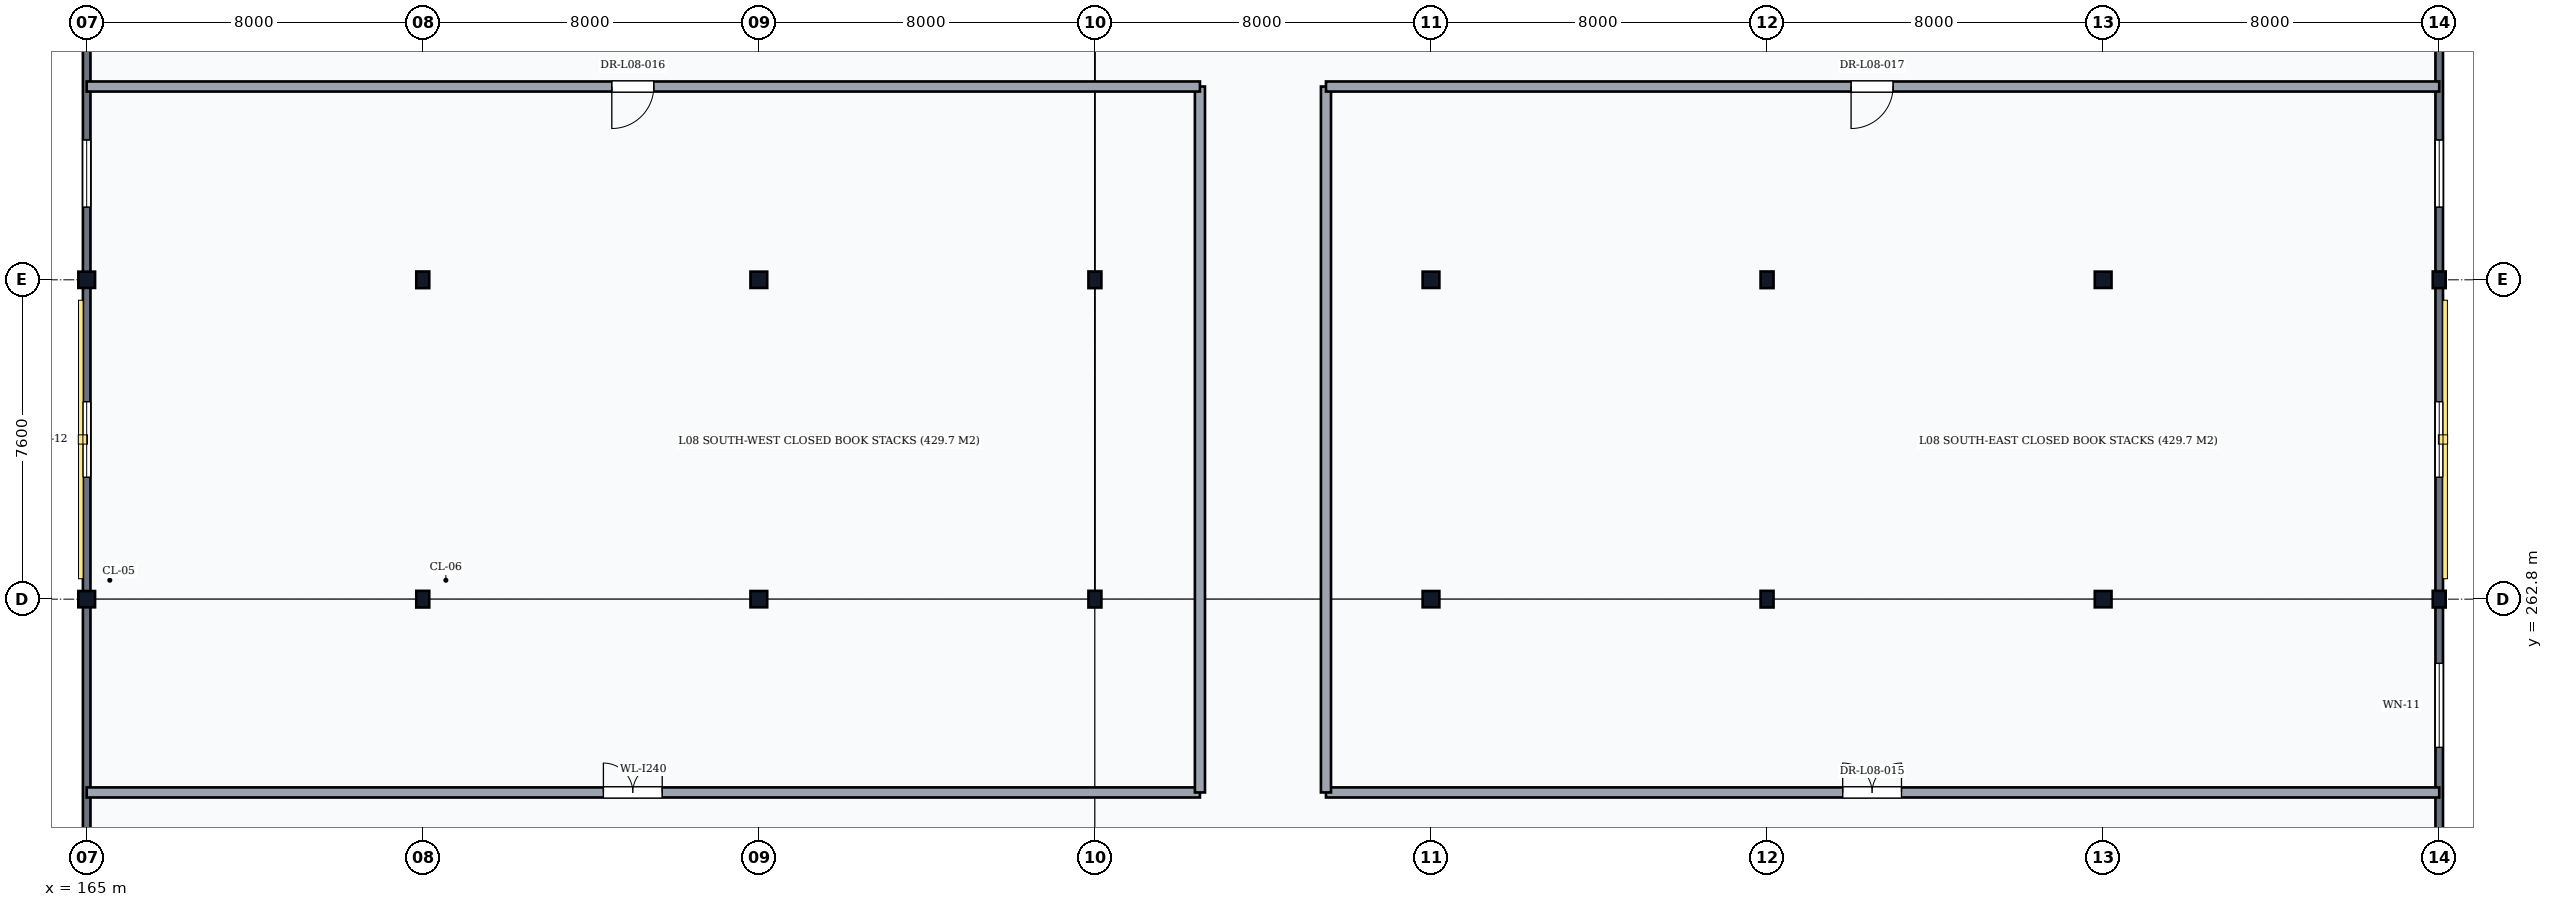
"""IFC4 building model, lengths in metres.
Left out: names, types, materials, properties, quantities, classifications, styles, units other than length and angle.
Written with IfcOpenShell. Run it as: python <this file> out.ifc"""

import sys

from ifc_helpers import new_model, si_unit, direction, frame, frame_2d, origin, origin_2d, place, context, subcontext, project, spatial, rectangle, i_section, extrude, element, fill, save


model = new_model("IFC4")
c1 = context("Model", 3, precision=1e-05, world=origin(), true_north=direction((0.0, 1.0)))
c2 = subcontext(c1, "Body", "Model", "MODEL_VIEW")
j1 = project(units=[si_unit("LENGTHUNIT", "METRE"), si_unit("PLANEANGLEUNIT", "RADIAN")], contexts=[c1])
p1 = place(None, origin())
s1 = spatial("IfcSite", under=j1, at=p1, CompositionType="ELEMENT")
p2 = place(p1, origin())
s2 = spatial("IfcBuilding", under=s1, at=p2, CompositionType="ELEMENT")
p3 = place(p2, frame((0.0, 0.0, 32.1)))
s3 = spatial("IfcBuildingStorey", under=s2, at=p3, CompositionType="ELEMENT", Elevation=32.1)
for number, where, z_axis, x_axis in (
    (1, (165.0, 262.8, 0.0), (0.0, 0.0, 1.0), (1.0, 0.0, 0.0)),
    (2, (165.0, 270.4, 0.0), (0.0, 0.0, 1.0), (1.0, 0.0, 0.0)),
):
    element("IfcColumn", number, at=place(p3, frame(where, z_axis=z_axis, x_axis=x_axis)), inside=s3, PredefinedType="COLUMN", context=c2, shape_type="SweptSolid", body=[
        extrude(i_section(OverallWidth=0.398, OverallDepth=0.387, WebThickness=0.021, FlangeThickness=0.033, FilletRadius=0.015, at=origin_2d()), origin(), (0.0, 0.0, 1.0), 3.9),
    ])
for number, where, z_axis, x_axis in (
    (3, (173.0, 262.8, 0.0), (0.0, 0.0, 1.0), (1.0, 0.0, 0.0)),
    (4, (173.0, 270.4, 0.0), (0.0, 0.0, 1.0), (1.0, 0.0, 0.0)),
):
    element("IfcColumn", number, at=place(p3, frame(where, z_axis=z_axis, x_axis=x_axis)), inside=s3, PredefinedType="COLUMN", context=c2, shape_type="SweptSolid", body=[
        extrude(i_section(OverallWidth=0.308, OverallDepth=0.395, WebThickness=0.021, FlangeThickness=0.04, FilletRadius=0.027, at=origin_2d()), origin(), (0.0, 0.0, 1.0), 3.9),
    ])
for number, where, z_axis, x_axis in (
    (5, (181.0, 262.8, 0.0), (0.0, 0.0, 1.0), (1.0, 0.0, 0.0)),
    (6, (181.0, 270.4, 0.0), (0.0, 0.0, 1.0), (1.0, 0.0, 0.0)),
):
    element("IfcColumn", number, at=place(p3, frame(where, z_axis=z_axis, x_axis=x_axis)), inside=s3, PredefinedType="COLUMN", context=c2, shape_type="SweptSolid", body=[
        extrude(i_section(OverallWidth=0.398, OverallDepth=0.387, WebThickness=0.021, FlangeThickness=0.033, FilletRadius=0.015, at=origin_2d()), origin(), (0.0, 0.0, 1.0), 3.9),
    ])
for number, where, z_axis, x_axis in (
    (7, (189.0, 262.8, 0.0), (0.0, 0.0, 1.0), (1.0, 0.0, 0.0)),
    (8, (189.0, 270.4, 0.0), (0.0, 0.0, 1.0), (1.0, 0.0, 0.0)),
):
    element("IfcColumn", number, at=place(p3, frame(where, z_axis=z_axis, x_axis=x_axis)), inside=s3, PredefinedType="COLUMN", context=c2, shape_type="SweptSolid", body=[
        extrude(i_section(OverallWidth=0.308, OverallDepth=0.395, WebThickness=0.021, FlangeThickness=0.04, FilletRadius=0.027, at=origin_2d()), origin(), (0.0, 0.0, 1.0), 3.9),
    ])
for number, where, z_axis, x_axis in (
    (9, (197.0, 262.8, 0.0), (0.0, 0.0, 1.0), (1.0, 0.0, 0.0)),
    (10, (197.0, 270.4, 0.0), (0.0, 0.0, 1.0), (1.0, 0.0, 0.0)),
):
    element("IfcColumn", number, at=place(p3, frame(where, z_axis=z_axis, x_axis=x_axis)), inside=s3, PredefinedType="COLUMN", context=c2, shape_type="SweptSolid", body=[
        extrude(i_section(OverallWidth=0.398, OverallDepth=0.387, WebThickness=0.021, FlangeThickness=0.033, FilletRadius=0.015, at=origin_2d()), origin(), (0.0, 0.0, 1.0), 3.9),
    ])
for number, where, z_axis, x_axis in (
    (11, (205.0, 262.8, 0.0), (0.0, 0.0, 1.0), (1.0, 0.0, 0.0)),
    (12, (205.0, 270.4, 0.0), (0.0, 0.0, 1.0), (1.0, 0.0, 0.0)),
):
    element("IfcColumn", number, at=place(p3, frame(where, z_axis=z_axis, x_axis=x_axis)), inside=s3, PredefinedType="COLUMN", context=c2, shape_type="SweptSolid", body=[
        extrude(i_section(OverallWidth=0.308, OverallDepth=0.395, WebThickness=0.021, FlangeThickness=0.04, FilletRadius=0.027, at=origin_2d()), origin(), (0.0, 0.0, 1.0), 3.9),
    ])
for number, where, z_axis, x_axis in (
    (13, (213.0, 262.8, 0.0), (0.0, 0.0, 1.0), (1.0, 0.0, 0.0)),
    (14, (213.0, 270.4, 0.0), (0.0, 0.0, 1.0), (1.0, 0.0, 0.0)),
):
    element("IfcColumn", number, at=place(p3, frame(where, z_axis=z_axis, x_axis=x_axis)), inside=s3, PredefinedType="COLUMN", context=c2, shape_type="SweptSolid", body=[
        extrude(i_section(OverallWidth=0.398, OverallDepth=0.387, WebThickness=0.021, FlangeThickness=0.033, FilletRadius=0.015, at=origin_2d()), origin(), (0.0, 0.0, 1.0), 3.9),
    ])
for number, where, z_axis, x_axis in (
    (15, (221.0, 262.8, 0.0), (0.0, 0.0, 1.0), (1.0, 0.0, 0.0)),
    (16, (221.0, 270.4, 0.0), (0.0, 0.0, 1.0), (1.0, 0.0, 0.0)),
):
    element("IfcColumn", number, at=place(p3, frame(where, z_axis=z_axis, x_axis=x_axis)), inside=s3, PredefinedType="COLUMN", context=c2, shape_type="SweptSolid", body=[
        extrude(i_section(OverallWidth=0.308, OverallDepth=0.395, WebThickness=0.021, FlangeThickness=0.04, FilletRadius=0.027, at=origin_2d()), origin(), (0.0, 0.0, 1.0), 3.9),
    ])
p4 = place(p3, frame((165.0, 255.206, 0.0), z_axis=(0.0, 0.0, 1.0), x_axis=(0.0, 1.0, 0.0)))
e17 = element("IfcWall", 17, at=p4, inside=s3, PredefinedType="SOLIDWALL", context=c2, shape_type="SweptSolid", body=[
    extrude(rectangle(XDim=7.588, YDim=0.18, at=frame_2d((3.794, 0.0))), origin(), (0.0, 0.0, 1.0), 3.408),
])
p5 = place(p3, frame((165.0, 262.806, 0.0), z_axis=(0.0, 0.0, 1.0), x_axis=(0.0, 1.0, 0.0)))
e18 = element("IfcWall", 18, at=p5, inside=s3, PredefinedType="SOLIDWALL", context=c2, shape_type="SweptSolid", body=[
    extrude(rectangle(XDim=7.588, YDim=0.18, at=frame_2d((3.794, 0.0))), origin(), (0.0, 0.0, 1.0), 3.408),
])
p6 = place(p5, frame((2.894, 0.0, 0.95)))
e19 = element("IfcOpeningElement", 19, at=p6, cuts=e18, PredefinedType="OPENING", context=c2, shape_type="SweptSolid", body=[
    extrude(rectangle(XDim=1.8, YDim=2.0, at=frame_2d((0.9, 1.0))), frame((0.0, 0.105, 0.0), z_axis=(0.0, -1.0, 0.0), x_axis=(1.0, 0.0, 0.0)), (0.0, 0.0, 1.0), 0.21),
])
p7 = place(p3, frame((165.0, 270.406, 0.0), z_axis=(0.0, 0.0, 1.0), x_axis=(0.0, 1.0, 0.0)))
e20 = element("IfcWall", 20, at=p7, inside=s3, PredefinedType="SOLIDWALL", context=c2, shape_type="SweptSolid", body=[
    extrude(rectangle(XDim=7.588, YDim=0.18, at=frame_2d((3.794, 0.0))), origin(), (0.0, 0.0, 1.0), 3.408),
])
p8 = place(p7, frame((1.722, 0.0, 0.95)))
e21 = element("IfcOpeningElement", 21, at=p8, cuts=e20, PredefinedType="OPENING", context=c2, shape_type="SweptSolid", body=[
    extrude(rectangle(XDim=1.6, YDim=2.0, at=frame_2d((0.8, 1.0))), frame((0.0, 0.105, 0.0), z_axis=(0.0, -1.0, 0.0), x_axis=(1.0, 0.0, 0.0)), (0.0, 0.0, 1.0), 0.21),
])
p9 = place(p3, frame((221.0, 255.206, 0.0), z_axis=(0.0, 0.0, 1.0), x_axis=(0.0, 1.0, 0.0)))
e22 = element("IfcWall", 22, at=p9, inside=s3, PredefinedType="SOLIDWALL", context=c2, shape_type="SweptSolid", body=[
    extrude(rectangle(XDim=7.588, YDim=0.18, at=frame_2d((3.794, 0.0))), origin(), (0.0, 0.0, 1.0), 3.408),
])
p10 = place(p9, frame((4.066, 0.0, 0.95)))
e23 = element("IfcOpeningElement", 23, at=p10, cuts=e22, PredefinedType="OPENING", context=c2, shape_type="SweptSolid", body=[
    extrude(rectangle(XDim=2.0, YDim=2.1, at=frame_2d((1.0, 1.05))), frame((0.0, 0.105, 0.0), z_axis=(0.0, -1.0, 0.0), x_axis=(1.0, 0.0, 0.0)), (0.0, 0.0, 1.0), 0.21),
])
p11 = place(p3, frame((221.0, 262.806, 0.0), z_axis=(0.0, 0.0, 1.0), x_axis=(0.0, 1.0, 0.0)))
e24 = element("IfcWall", 24, at=p11, inside=s3, PredefinedType="SOLIDWALL", context=c2, shape_type="SweptSolid", body=[
    extrude(rectangle(XDim=7.588, YDim=0.18, at=frame_2d((3.794, 0.0))), origin(), (0.0, 0.0, 1.0), 3.408),
])
p12 = place(p11, frame((2.894, 0.0, 0.95)))
e25 = element("IfcOpeningElement", 25, at=p12, cuts=e24, PredefinedType="OPENING", context=c2, shape_type="SweptSolid", body=[
    extrude(rectangle(XDim=1.8, YDim=2.0, at=frame_2d((0.9, 1.0))), frame((0.0, 0.105, 0.0), z_axis=(0.0, -1.0, 0.0), x_axis=(1.0, 0.0, 0.0)), (0.0, 0.0, 1.0), 0.21),
])
p13 = place(p3, frame((221.0, 270.406, 0.0), z_axis=(0.0, 0.0, 1.0), x_axis=(0.0, 1.0, 0.0)))
e26 = element("IfcWall", 26, at=p13, inside=s3, PredefinedType="SOLIDWALL", context=c2, shape_type="SweptSolid", body=[
    extrude(rectangle(XDim=7.588, YDim=0.18, at=frame_2d((3.794, 0.0))), origin(), (0.0, 0.0, 1.0), 3.408),
])
p14 = place(p13, frame((1.722, 0.0, 0.95)))
e27 = element("IfcOpeningElement", 27, at=p14, cuts=e26, PredefinedType="OPENING", context=c2, shape_type="SweptSolid", body=[
    extrude(rectangle(XDim=1.6, YDim=2.0, at=frame_2d((0.8, 1.0))), frame((0.0, 0.105, 0.0), z_axis=(0.0, -1.0, 0.0), x_axis=(1.0, 0.0, 0.0)), (0.0, 0.0, 1.0), 0.21),
])
p15 = place(p3, frame((165.0, 258.2, 0.0), z_axis=(0.0, 0.0, 1.0), x_axis=(1.0, 0.0, 0.0)))
e28 = element("IfcWall", 28, at=p15, inside=s3, PredefinedType="PARTITIONING", context=c2, shape_type="SweptSolid", body=[
    extrude(rectangle(XDim=26.5, YDim=0.24, at=frame_2d((13.25, 0.0))), origin(), (0.0, 0.0, 1.0), 3.68),
])
p16 = place(p15, frame((12.3, 0.0, 0.0)))
e29 = element("IfcOpeningElement", 29, at=p16, cuts=e28, PredefinedType="OPENING", context=c2, shape_type="SweptSolid", body=[
    extrude(rectangle(XDim=1.4, YDim=2.1, at=frame_2d((0.7, 1.05))), frame((0.0, 0.135, 0.0), z_axis=(0.0, -1.0, 0.0), x_axis=(1.0, 0.0, 0.0)), (0.0, 0.0, 1.0), 0.27),
])
p17 = place(p3, frame((194.5, 258.2, 0.0), z_axis=(0.0, 0.0, 1.0), x_axis=(1.0, 0.0, 0.0)))
e30 = element("IfcWall", 30, at=p17, inside=s3, PredefinedType="PARTITIONING", context=c2, shape_type="SweptSolid", body=[
    extrude(rectangle(XDim=26.5, YDim=0.24, at=frame_2d((13.25, 0.0))), origin(), (0.0, 0.0, 1.0), 3.68),
])
p18 = place(p17, frame((12.3, 0.0, 0.0)))
e31 = element("IfcOpeningElement", 31, at=p18, cuts=e30, PredefinedType="OPENING", context=c2, shape_type="SweptSolid", body=[
    extrude(rectangle(XDim=1.4, YDim=2.1, at=frame_2d((0.7, 1.05))), frame((0.0, 0.135, 0.0), z_axis=(0.0, -1.0, 0.0), x_axis=(1.0, 0.0, 0.0)), (0.0, 0.0, 1.0), 0.27),
])
for number, where, z_axis, x_axis in (
    (32, (191.5, 258.2, 0.0), (0.0, 0.0, 1.0), (0.0, 1.0, 0.0)),
    (33, (194.5, 258.2, 0.0), (0.0, 0.0, 1.0), (0.0, 1.0, 0.0)),
):
    element("IfcWall", number, at=place(p3, frame(where, z_axis=z_axis, x_axis=x_axis)), inside=s3, PredefinedType="PARTITIONING", context=c2, shape_type="SweptSolid", body=[
        extrude(rectangle(XDim=16.8, YDim=0.24, at=frame_2d((8.4, 0.0))), origin(), (0.0, 0.0, 1.0), 3.68),
    ])
p19 = place(p3, frame((165.0, 275.0, 0.0), z_axis=(0.0, 0.0, 1.0), x_axis=(1.0, 0.0, 0.0)))
e34 = element("IfcWall", 34, at=p19, inside=s3, PredefinedType="PARTITIONING", context=c2, shape_type="SweptSolid", body=[
    extrude(rectangle(XDim=26.5, YDim=0.24, at=frame_2d((13.25, 0.0))), origin(), (0.0, 0.0, 1.0), 3.68),
])
p20 = place(p19, frame((12.5, 0.0, 0.0)))
e35 = element("IfcOpeningElement", 35, at=p20, cuts=e34, PredefinedType="OPENING", context=c2, shape_type="SweptSolid", body=[
    extrude(rectangle(XDim=1.0, YDim=2.1, at=frame_2d((0.5, 1.05))), frame((0.0, 0.135, 0.0), z_axis=(0.0, -1.0, 0.0), x_axis=(1.0, 0.0, 0.0)), (0.0, 0.0, 1.0), 0.27),
])
p21 = place(p3, frame((194.5, 275.0, 0.0), z_axis=(0.0, 0.0, 1.0), x_axis=(1.0, 0.0, 0.0)))
e36 = element("IfcWall", 36, at=p21, inside=s3, PredefinedType="PARTITIONING", context=c2, shape_type="SweptSolid", body=[
    extrude(rectangle(XDim=26.5, YDim=0.24, at=frame_2d((13.25, 0.0))), origin(), (0.0, 0.0, 1.0), 3.68),
])
p22 = place(p21, frame((12.5, 0.0, 0.0)))
e37 = element("IfcOpeningElement", 37, at=p22, cuts=e36, PredefinedType="OPENING", context=c2, shape_type="SweptSolid", body=[
    extrude(rectangle(XDim=1.0, YDim=2.1, at=frame_2d((0.5, 1.05))), frame((0.0, 0.135, 0.0), z_axis=(0.0, -1.0, 0.0), x_axis=(1.0, 0.0, 0.0)), (0.0, 0.0, 1.0), 0.27),
])
p23 = place(p6, origin())
e38 = element("IfcWindow", 38, at=p23, inside=s3, PartitioningType="DOUBLE_PANEL_VERTICAL", PredefinedType="WINDOW", context=c2, shape_type="SweptSolid", body=[
    extrude(rectangle(XDim=1.8, YDim=2.0, at=frame_2d((0.9, 1.0))), frame((0.0, 0.03, 0.0), z_axis=(0.0, -1.0, 0.0), x_axis=(1.0, 0.0, 0.0)), (0.0, 0.0, 1.0), 0.06),
])
fill(e19, e38)
p24 = place(p8, origin())
e39 = element("IfcWindow", 39, at=p24, inside=s3, PartitioningType="SINGLE_PANEL", PredefinedType="WINDOW", context=c2, shape_type="SweptSolid", body=[
    extrude(rectangle(XDim=1.6, YDim=2.0, at=frame_2d((0.8, 1.0))), frame((0.0, 0.03, 0.0), z_axis=(0.0, -1.0, 0.0), x_axis=(1.0, 0.0, 0.0)), (0.0, 0.0, 1.0), 0.06),
])
fill(e21, e39)
p25 = place(p10, origin())
e40 = element("IfcWindow", 40, at=p25, inside=s3, PartitioningType="DOUBLE_PANEL_VERTICAL", PredefinedType="WINDOW", context=c2, shape_type="SweptSolid", body=[
    extrude(rectangle(XDim=2.0, YDim=2.1, at=frame_2d((1.0, 1.05))), frame((0.0, 0.03, 0.0), z_axis=(0.0, -1.0, 0.0), x_axis=(1.0, 0.0, 0.0)), (0.0, 0.0, 1.0), 0.06),
])
fill(e23, e40)
p26 = place(p12, origin())
e41 = element("IfcWindow", 41, at=p26, inside=s3, PartitioningType="DOUBLE_PANEL_VERTICAL", PredefinedType="WINDOW", context=c2, shape_type="SweptSolid", body=[
    extrude(rectangle(XDim=1.8, YDim=2.0, at=frame_2d((0.9, 1.0))), frame((0.0, 0.03, 0.0), z_axis=(0.0, -1.0, 0.0), x_axis=(1.0, 0.0, 0.0)), (0.0, 0.0, 1.0), 0.06),
])
fill(e25, e41)
p27 = place(p14, origin())
e42 = element("IfcWindow", 42, at=p27, inside=s3, PartitioningType="SINGLE_PANEL", PredefinedType="WINDOW", context=c2, shape_type="SweptSolid", body=[
    extrude(rectangle(XDim=1.6, YDim=2.0, at=frame_2d((0.8, 1.0))), frame((0.0, 0.03, 0.0), z_axis=(0.0, -1.0, 0.0), x_axis=(1.0, 0.0, 0.0)), (0.0, 0.0, 1.0), 0.06),
])
fill(e27, e42)
p28 = place(p16, origin())
e43 = element("IfcDoor", 43, at=p28, inside=s3, OperationType="DOUBLE_DOOR_SINGLE_SWING", PredefinedType="DOOR", context=c2, shape_type="SweptSolid", body=[
    extrude(rectangle(XDim=1.4, YDim=2.1, at=frame_2d((0.7, 1.05))), frame((0.0, 0.025, 0.0), z_axis=(0.0, -1.0, 0.0), x_axis=(1.0, 0.0, 0.0)), (0.0, 0.0, 1.0), 0.05),
])
fill(e29, e43)
p29 = place(p18, origin())
e44 = element("IfcDoor", 44, at=p29, inside=s3, OperationType="DOUBLE_DOOR_SINGLE_SWING", PredefinedType="DOOR", context=c2, shape_type="SweptSolid", body=[
    extrude(rectangle(XDim=1.4, YDim=2.1, at=frame_2d((0.7, 1.05))), frame((0.0, 0.025, 0.0), z_axis=(0.0, -1.0, 0.0), x_axis=(1.0, 0.0, 0.0)), (0.0, 0.0, 1.0), 0.05),
])
fill(e31, e44)
p30 = place(p20, frame((1.0, 0.0, 0.0), z_axis=(0.0, 0.0, 1.0), x_axis=(-1.0, 0.0, 0.0)))
e45 = element("IfcDoor", 45, at=p30, inside=s3, OperationType="SINGLE_SWING_RIGHT", PredefinedType="DOOR", context=c2, shape_type="SweptSolid", body=[
    extrude(rectangle(XDim=1.0, YDim=2.1, at=frame_2d((0.5, 1.05))), frame((0.0, 0.025, 0.0), z_axis=(0.0, -1.0, 0.0), x_axis=(1.0, 0.0, 0.0)), (0.0, 0.0, 1.0), 0.05),
])
fill(e35, e45)
p31 = place(p22, frame((1.0, 0.0, 0.0), z_axis=(0.0, 0.0, 1.0), x_axis=(-1.0, 0.0, 0.0)))
e46 = element("IfcDoor", 46, at=p31, inside=s3, OperationType="SINGLE_SWING_RIGHT", PredefinedType="DOOR", context=c2, shape_type="SweptSolid", body=[
    extrude(rectangle(XDim=1.0, YDim=2.1, at=frame_2d((0.5, 1.05))), frame((0.0, 0.025, 0.0), z_axis=(0.0, -1.0, 0.0), x_axis=(1.0, 0.0, 0.0)), (0.0, 0.0, 1.0), 0.05),
])
fill(e37, e46)
save(model, sys.argv[1])
